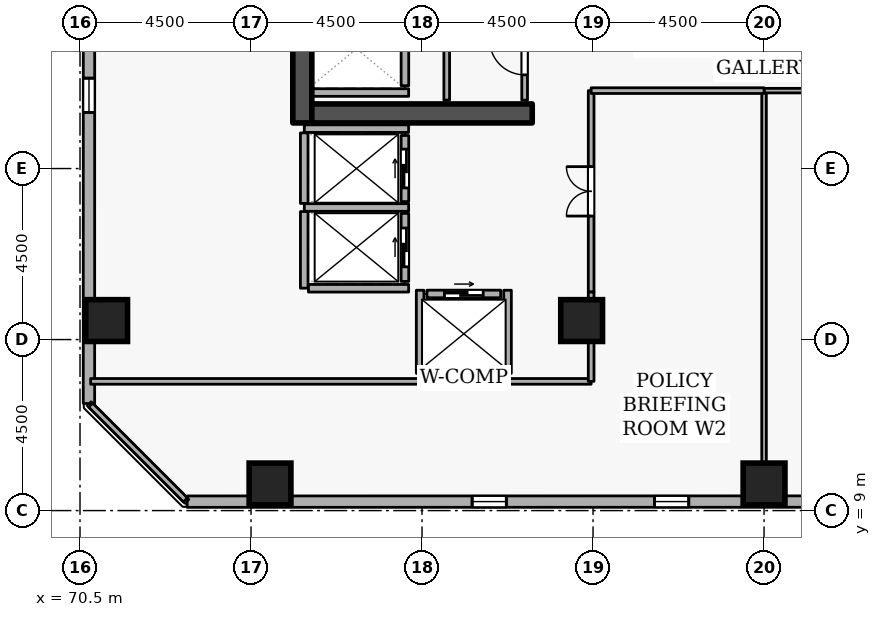
"""IFC4 building model, lengths in metres.
Left out: names, types, materials, properties, quantities, classifications, styles, units other than length and angle.
Written with IfcOpenShell. Run it as: python <this file> out.ifc"""

import sys

from ifc_helpers import new_model, si_unit, direction, frame, frame_2d, origin, origin_2d, place, context, subcontext, project, spatial, rectangle, extrude, element, fill, save


model = new_model("IFC4")
c1 = context("Model", 3, precision=1e-05, world=origin(), true_north=direction((0.0, 1.0)))
c2 = subcontext(c1, "Body", "Model", "MODEL_VIEW")
j1 = project(units=[si_unit("LENGTHUNIT", "METRE"), si_unit("PLANEANGLEUNIT", "RADIAN")], contexts=[c1])
p1 = place(None, origin())
s1 = spatial("IfcSite", under=j1, at=p1, CompositionType="ELEMENT")
p2 = place(p1, origin())
s2 = spatial("IfcBuilding", under=s1, at=p2, CompositionType="ELEMENT")
p3 = place(p2, frame((0.0, 0.0, 156.3)))
s3 = spatial("IfcBuildingStorey", under=s2, at=p3, CompositionType="ELEMENT", Elevation=156.3)
p4 = place(p3, frame((76.35, 19.2, 0.0), z_axis=(0.0, 0.0, 1.0), x_axis=(0.0, 1.0, 0.0)))
e1 = element("IfcWall", 1, at=p4, inside=s3, PredefinedType="SHEAR", context=c2, shape_type="SweptSolid", body=[
    extrude(rectangle(XDim=15.6, YDim=0.5, at=frame_2d((7.8, 0.0))), origin(), (0.0, 0.0, 1.0), 3.6),
])
p5 = place(p3, frame((76.6, 19.45, 0.0), z_axis=(0.0, 0.0, 1.0), x_axis=(1.0, 0.0, 0.0)))
e2 = element("IfcWall", 2, at=p5, inside=s3, PredefinedType="SHEAR", context=c2, shape_type="SweptSolid", body=[
    extrude(rectangle(XDim=5.8, YDim=0.5, at=frame_2d((2.9, 0.0))), origin(), (0.0, 0.0, 1.0), 3.6),
])
for number, where, z_axis, x_axis in (
    (3, (71.2, 14.0, 0.0), (0.0, 0.0, 1.0), (1.0, 0.0, 0.0)),
    (4, (88.5, 9.7, 0.0), (0.0, 0.0, 1.0), (1.0, 0.0, 0.0)),
    (5, (75.5, 9.7, 0.0), (0.0, 0.0, 1.0), (1.0, 0.0, 0.0)),
    (6, (83.7, 14.0, 0.0), (0.0, 0.0, 1.0), (1.0, 0.0, 0.0)),
):
    element("IfcColumn", number, at=place(p3, frame(where, z_axis=z_axis, x_axis=x_axis)), inside=s3, PredefinedType="COLUMN", context=c2, shape_type="SweptSolid", body=[
        extrude(rectangle(XDim=1.1, YDim=1.1, at=origin_2d()), origin(), (0.0, 0.0, 1.0), 3.6),
    ])
p6 = place(p3, frame((73.319, 9.235, 0.0), z_axis=(0.0, 0.0, 1.0), x_axis=(0.999999994606, 0.000103863011, 0.0)))
e7 = element("IfcWall", 7, at=p6, inside=s3, PredefinedType="STANDARD", context=c2, shape_type="SweptSolid", body=[
    extrude(rectangle(XDim=35.259, YDim=0.3, at=frame_2d((17.629, 0.0))), origin(), (0.0, 0.0, 1.0), 2.7),
])
p7 = place(p6, frame((7.5, 0.0, 0.72)))
e8 = element("IfcOpeningElement", 8, at=p7, cuts=e7, PredefinedType="OPENING", context=c2, shape_type="SweptSolid", body=[
    extrude(rectangle(XDim=0.9, YDim=1.75, at=frame_2d((0.45, 0.875))), frame((0.0, 0.16, 0.0), z_axis=(0.0, -1.0, 0.0), x_axis=(1.0, 0.0, 0.0)), (0.0, 0.0, 1.0), 0.32),
])
p8 = place(p6, frame((12.3, 0.0, 0.72)))
e9 = element("IfcOpeningElement", 9, at=p8, cuts=e7, PredefinedType="OPENING", context=c2, shape_type="SweptSolid", body=[
    extrude(rectangle(XDim=0.9, YDim=1.75, at=frame_2d((0.45, 0.875))), frame((0.0, 0.16, 0.0), z_axis=(0.0, -1.0, 0.0), x_axis=(1.0, 0.0, 0.0)), (0.0, 0.0, 1.0), 0.32),
])
p9 = place(p6, frame((17.1, 0.0, 0.72)))
e10 = element("IfcOpeningElement", 10, at=p9, cuts=e7, PredefinedType="OPENING", context=c2, shape_type="SweptSolid", body=[
    extrude(rectangle(XDim=0.9, YDim=1.75, at=frame_2d((0.45, 0.875))), frame((0.0, 0.16, 0.0), z_axis=(0.0, -1.0, 0.0), x_axis=(1.0, 0.0, 0.0)), (0.0, 0.0, 1.0), 0.32),
])
p10 = place(p6, frame((21.9, 0.0, 0.72)))
e11 = element("IfcOpeningElement", 11, at=p10, cuts=e7, PredefinedType="OPENING", context=c2, shape_type="SweptSolid", body=[
    extrude(rectangle(XDim=0.9, YDim=1.75, at=frame_2d((0.45, 0.875))), frame((0.0, 0.16, 0.0), z_axis=(0.0, -1.0, 0.0), x_axis=(1.0, 0.0, 0.0)), (0.0, 0.0, 1.0), 0.32),
])
p11 = place(p6, frame((31.5, 0.0, 0.72)))
e12 = element("IfcOpeningElement", 12, at=p11, cuts=e7, PredefinedType="OPENING", context=c2, shape_type="SweptSolid", body=[
    extrude(rectangle(XDim=0.9, YDim=1.75, at=frame_2d((0.45, 0.875))), frame((0.0, 0.16, 0.0), z_axis=(0.0, -1.0, 0.0), x_axis=(1.0, 0.0, 0.0)), (0.0, 0.0, 1.0), 0.32),
])
p12 = place(p3, frame((70.739, 47.078, 0.0), z_axis=(0.0, 0.0, 1.0), x_axis=(-0.000103863011, -0.999999994606, 0.0)))
e13 = element("IfcWall", 13, at=p12, inside=s3, PredefinedType="STANDARD", context=c2, shape_type="SweptSolid", body=[
    extrude(rectangle(XDim=35.259, YDim=0.3, at=frame_2d((17.629, 0.0))), origin(), (0.0, 0.0, 1.0), 2.7),
])
p13 = place(p12, frame((2.7, 0.0, 0.72)))
e14 = element("IfcOpeningElement", 14, at=p13, cuts=e13, PredefinedType="OPENING", context=c2, shape_type="SweptSolid", body=[
    extrude(rectangle(XDim=0.9, YDim=1.75, at=frame_2d((0.45, 0.875))), frame((0.0, 0.16, 0.0), z_axis=(0.0, -1.0, 0.0), x_axis=(1.0, 0.0, 0.0)), (0.0, 0.0, 1.0), 0.32),
])
p14 = place(p12, frame((12.3, 0.0, 0.72)))
e15 = element("IfcOpeningElement", 15, at=p14, cuts=e13, PredefinedType="OPENING", context=c2, shape_type="SweptSolid", body=[
    extrude(rectangle(XDim=0.9, YDim=1.75, at=frame_2d((0.45, 0.875))), frame((0.0, 0.16, 0.0), z_axis=(0.0, -1.0, 0.0), x_axis=(1.0, 0.0, 0.0)), (0.0, 0.0, 1.0), 0.32),
])
p15 = place(p12, frame((17.1, 0.0, 0.72)))
e16 = element("IfcOpeningElement", 16, at=p15, cuts=e13, PredefinedType="OPENING", context=c2, shape_type="SweptSolid", body=[
    extrude(rectangle(XDim=0.9, YDim=1.75, at=frame_2d((0.45, 0.875))), frame((0.0, 0.16, 0.0), z_axis=(0.0, -1.0, 0.0), x_axis=(1.0, 0.0, 0.0)), (0.0, 0.0, 1.0), 0.32),
])
p16 = place(p12, frame((21.9, 0.0, 0.72)))
e17 = element("IfcOpeningElement", 17, at=p16, cuts=e13, PredefinedType="OPENING", context=c2, shape_type="SweptSolid", body=[
    extrude(rectangle(XDim=0.9, YDim=1.75, at=frame_2d((0.45, 0.875))), frame((0.0, 0.16, 0.0), z_axis=(0.0, -1.0, 0.0), x_axis=(1.0, 0.0, 0.0)), (0.0, 0.0, 1.0), 0.32),
])
p17 = place(p12, frame((26.7, 0.0, 0.72)))
e18 = element("IfcOpeningElement", 18, at=p17, cuts=e13, PredefinedType="OPENING", context=c2, shape_type="SweptSolid", body=[
    extrude(rectangle(XDim=0.9, YDim=1.75, at=frame_2d((0.45, 0.875))), frame((0.0, 0.16, 0.0), z_axis=(0.0, -1.0, 0.0), x_axis=(1.0, 0.0, 0.0)), (0.0, 0.0, 1.0), 0.32),
])
p18 = place(p3, frame((79.05, 20.18, 0.0), z_axis=(0.0, 0.0, 1.0), x_axis=(0.0, 1.0, 0.0)))
e19 = element("IfcWall", 19, at=p18, inside=s3, PredefinedType="STANDARD", context=c2, shape_type="SweptSolid", body=[
    extrude(rectangle(XDim=1.94, YDim=0.2, at=frame_2d((0.97, 0.0))), origin(), (0.0, 0.0, 1.0), 3.34),
])
p19 = place(p3, frame((79.05, 17.13, 0.0), z_axis=(0.0, 0.0, 1.0), x_axis=(0.0, 1.0, 0.0)))
e20 = element("IfcWall", 20, at=p19, inside=s3, PredefinedType="STANDARD", context=c2, shape_type="SweptSolid", body=[
    extrude(rectangle(XDim=1.74, YDim=0.2, at=frame_2d((0.87, 0.0))), origin(), (0.0, 0.0, 1.0), 3.34),
])
p20 = place(p19, frame((0.36, 0.0, 0.0)))
e21 = element("IfcOpeningElement", 21, at=p20, cuts=e20, PredefinedType="OPENING", context=c2, shape_type="SweptSolid", body=[
    extrude(rectangle(XDim=1.02, YDim=2.06, at=frame_2d((0.51, 1.03))), frame((0.0, 0.11, 0.0), z_axis=(0.0, -1.0, 0.0), x_axis=(1.0, 0.0, 0.0)), (0.0, 0.0, 1.0), 0.22),
])
p21 = place(p3, frame((79.05, 15.03, 0.0), z_axis=(0.0, 0.0, 1.0), x_axis=(0.0, 1.0, 0.0)))
e22 = element("IfcWall", 22, at=p21, inside=s3, PredefinedType="STANDARD", context=c2, shape_type="SweptSolid", body=[
    extrude(rectangle(XDim=1.79, YDim=0.2, at=frame_2d((0.895, 0.0))), origin(), (0.0, 0.0, 1.0), 3.34),
])
p22 = place(p21, frame((0.385, 0.0, 0.0)))
e23 = element("IfcOpeningElement", 23, at=p22, cuts=e22, PredefinedType="OPENING", context=c2, shape_type="SweptSolid", body=[
    extrude(rectangle(XDim=1.02, YDim=2.06, at=frame_2d((0.51, 1.03))), frame((0.0, 0.11, 0.0), z_axis=(0.0, -1.0, 0.0), x_axis=(1.0, 0.0, 0.0)), (0.0, 0.0, 1.0), 0.22),
])
p23 = place(p3, frame((79.63, 14.7, 0.0), z_axis=(0.0, 0.0, 1.0), x_axis=(1.0, 0.0, 0.0)))
e24 = element("IfcWall", 24, at=p23, inside=s3, PredefinedType="STANDARD", context=c2, shape_type="SweptSolid", body=[
    extrude(rectangle(XDim=1.94, YDim=0.2, at=frame_2d((0.97, 0.0))), origin(), (0.0, 0.0, 1.0), 3.34),
])
p24 = place(p23, frame((0.46, 0.0, 0.0)))
e25 = element("IfcOpeningElement", 25, at=p24, cuts=e24, PredefinedType="OPENING", context=c2, shape_type="SweptSolid", body=[
    extrude(rectangle(XDim=1.02, YDim=2.06, at=frame_2d((0.51, 1.03))), frame((0.0, 0.11, 0.0), z_axis=(0.0, -1.0, 0.0), x_axis=(1.0, 0.0, 0.0)), (0.0, 0.0, 1.0), 0.22),
])
p25 = place(p3, frame((76.612, 20.0, 0.0), z_axis=(0.0, 0.0, 1.0), x_axis=(1.0, 0.0, 0.0)))
e26 = element("IfcWall", 26, at=p25, inside=s3, PredefinedType="STANDARD", context=c2, shape_type="SweptSolid", body=[
    extrude(rectangle(XDim=2.536, YDim=0.2, at=frame_2d((1.268, 0.0))), origin(), (0.0, 0.0, 1.0), 3.34),
])
p26 = place(p3, frame((76.402, 19.05, 0.0), z_axis=(0.0, 0.0, 1.0), x_axis=(1.0, 0.0, 0.0)))
e27 = element("IfcWall", 27, at=p26, inside=s3, PredefinedType="STANDARD", context=c2, shape_type="SweptSolid", body=[
    extrude(rectangle(XDim=2.746, YDim=0.2, at=frame_2d((1.373, 0.0))), origin(), (0.0, 0.0, 1.0), 2.545),
])
p27 = place(p3, frame((76.402, 16.975, 0.0), z_axis=(0.0, 0.0, 1.0), x_axis=(1.0, 0.0, 0.0)))
e28 = element("IfcWall", 28, at=p27, inside=s3, PredefinedType="STANDARD", context=c2, shape_type="SweptSolid", body=[
    extrude(rectangle(XDim=2.746, YDim=0.2, at=frame_2d((1.373, 0.0))), origin(), (0.0, 0.0, 1.0), 3.34),
])
p28 = place(p3, frame((76.4, 14.852, 0.0), z_axis=(0.0, 0.0, 1.0), x_axis=(0.0, 1.0, 0.0)))
e29 = element("IfcWall", 29, at=p28, inside=s3, PredefinedType="STANDARD", context=c2, shape_type="SweptSolid", body=[
    extrude(rectangle(XDim=2.016, YDim=0.2, at=frame_2d((1.008, 0.0))), origin(), (0.0, 0.0, 1.0), 3.34),
])
p29 = place(p3, frame((76.4, 17.082, 0.0), z_axis=(0.0, 0.0, 1.0), x_axis=(0.0, 1.0, 0.0)))
e30 = element("IfcWall", 30, at=p29, inside=s3, PredefinedType="STANDARD", context=c2, shape_type="SweptSolid", body=[
    extrude(rectangle(XDim=1.856, YDim=0.2, at=frame_2d((0.928, 0.0))), origin(), (0.0, 0.0, 1.0), 3.34),
])
p30 = place(p3, frame((76.512, 14.85, 0.0), z_axis=(0.0, 0.0, 1.0), x_axis=(1.0, 0.0, 0.0)))
e31 = element("IfcWall", 31, at=p30, inside=s3, PredefinedType="STANDARD", context=c2, shape_type="SweptSolid", body=[
    extrude(rectangle(XDim=2.636, YDim=0.2, at=frame_2d((1.318, 0.0))), origin(), (0.0, 0.0, 1.0), 3.34),
])
p31 = place(p3, frame((79.452, 12.5, 0.0), z_axis=(0.0, 0.0, 1.0), x_axis=(1.0, 0.0, 0.0)))
e32 = element("IfcWall", 32, at=p31, inside=s3, PredefinedType="STANDARD", context=c2, shape_type="SweptSolid", body=[
    extrude(rectangle(XDim=2.296, YDim=0.2, at=frame_2d((1.148, 0.0))), origin(), (0.0, 0.0, 1.0), 3.34),
])
for number, where, z_axis, x_axis in (
    (33, (81.75, 12.612, 0.0), (0.0, 0.0, 1.0), (0.0, 1.0, 0.0)),
    (34, (79.45, 12.612, 0.0), (0.0, 0.0, 1.0), (0.0, 1.0, 0.0)),
):
    element("IfcWall", number, at=place(p3, frame(where, z_axis=z_axis, x_axis=x_axis)), inside=s3, PredefinedType="STANDARD", context=c2, shape_type="SweptSolid", body=[
        extrude(rectangle(XDim=2.186, YDim=0.2, at=frame_2d((1.093, 0.0))), origin(), (0.0, 0.0, 1.0), 3.34),
    ])
p32 = place(p3, frame((82.2, 19.8, 0.0), z_axis=(0.0, 0.0, 1.0), x_axis=(0.0, 1.0, 0.0)))
e35 = element("IfcWall", 35, at=p32, inside=s3, PredefinedType="PARTITIONING", context=c2, shape_type="SweptSolid", body=[
    extrude(rectangle(XDim=2.25, YDim=0.15, at=frame_2d((1.125, 0.0))), origin(), (0.0, 0.0, 1.0), 3.34),
])
p33 = place(p32, frame((0.665, 0.0, 0.0)))
e36 = element("IfcOpeningElement", 36, at=p33, cuts=e35, PredefinedType="OPENING", context=c2, shape_type="SweptSolid", body=[
    extrude(rectangle(XDim=0.92, YDim=2.08, at=frame_2d((0.46, 1.04))), frame((0.0, 0.085, 0.0), z_axis=(0.0, -1.0, 0.0), x_axis=(1.0, 0.0, 0.0)), (0.0, 0.0, 1.0), 0.17),
])
p34 = place(p3, frame((80.15, 22.05, 0.0), z_axis=(0.0, 0.0, 1.0), x_axis=(0.0, -1.0, 0.0)))
e37 = element("IfcWall", 37, at=p34, inside=s3, PredefinedType="PARTITIONING", context=c2, shape_type="SweptSolid", body=[
    extrude(rectangle(XDim=2.25, YDim=0.15, at=frame_2d((1.125, 0.0))), origin(), (0.0, 0.0, 1.0), 3.34),
])
p35 = place(p3, frame((88.5, 9.28, 0.0), z_axis=(0.0, 0.0, 1.0), x_axis=(0.0, 1.0, 0.0)))
e38 = element("IfcWall", 38, at=p35, inside=s3, PredefinedType="PARTITIONING", context=c2, shape_type="SweptSolid", body=[
    extrude(rectangle(XDim=10.77, YDim=0.12, at=frame_2d((5.385, 0.0))), origin(), (0.0, 0.0, 1.0), 2.932),
])
p36 = place(p3, frame((88.5, 20.05, 0.0), z_axis=(0.0, 0.0, 1.0), x_axis=(1.0, 0.0, 0.0)))
e39 = element("IfcWall", 39, at=p36, inside=s3, PredefinedType="PARTITIONING", context=c2, shape_type="SweptSolid", body=[
    extrude(rectangle(XDim=4.55, YDim=0.12, at=frame_2d((2.275, 0.0))), origin(), (0.0, 0.0, 1.0), 3.34),
])
p37 = place(p3, frame((83.95, 14.75, 0.0), z_axis=(0.0, 0.0, 1.0), x_axis=(0.0, 1.0, 0.0)))
e40 = element("IfcWall", 40, at=p37, inside=s3, PredefinedType="PARTITIONING", context=c2, shape_type="SweptSolid", body=[
    extrude(rectangle(XDim=5.3, YDim=0.15, at=frame_2d((2.65, 0.0))), origin(), (0.0, 0.0, 1.0), 3.34),
])
p38 = place(p37, frame((2.0, 0.0, 0.0)))
e41 = element("IfcOpeningElement", 41, at=p38, cuts=e40, PredefinedType="OPENING", context=c2, shape_type="SweptSolid", body=[
    extrude(rectangle(XDim=1.3, YDim=2.12, at=frame_2d((0.65, 1.06))), frame((0.0, 0.085, 0.0), z_axis=(0.0, -1.0, 0.0), x_axis=(1.0, 0.0, 0.0)), (0.0, 0.0, 1.0), 0.17),
])
p39 = place(p3, frame((83.95, 20.05, 0.0), z_axis=(0.0, 0.0, 1.0), x_axis=(1.0, 0.0, 0.0)))
e42 = element("IfcWall", 42, at=p39, inside=s3, PredefinedType="PARTITIONING", context=c2, shape_type="SweptSolid", body=[
    extrude(rectangle(XDim=4.55, YDim=0.15, at=frame_2d((2.275, 0.0))), origin(), (0.0, 0.0, 1.0), 3.34),
])
p40 = place(p3, frame((73.275, 9.28, 0.0), z_axis=(0.0, 0.0, 1.0), x_axis=(-0.707106781187, 0.707106781187, 0.0)))
e43 = element("IfcWall", 43, at=p40, inside=s3, PredefinedType="PARTITIONING", context=c2, shape_type="SweptSolid", body=[
    extrude(rectangle(XDim=3.528, YDim=0.15, at=frame_2d((1.764, 0.0))), origin(), (0.0, 0.0, 1.0), 3.34),
])
p41 = place(p3, frame((70.78, 12.4, 0.0), z_axis=(0.0, 0.0, 1.0), x_axis=(1.0, 0.0, 0.0)))
e44 = element("IfcWall", 44, at=p41, inside=s3, PredefinedType="PARTITIONING", context=c2, shape_type="SweptSolid", body=[
    extrude(rectangle(XDim=8.672, YDim=0.15, at=frame_2d((4.336, 0.0))), origin(), (0.0, 0.0, 1.0), 3.34),
])
p42 = place(p3, frame((81.748, 12.4, 0.0), z_axis=(0.0, 0.0, 1.0), x_axis=(1.0, 0.0, 0.0)))
e45 = element("IfcWall", 45, at=p42, inside=s3, PredefinedType="PARTITIONING", context=c2, shape_type="SweptSolid", body=[
    extrude(rectangle(XDim=2.202, YDim=0.15, at=frame_2d((1.101, 0.0))), origin(), (0.0, 0.0, 1.0), 3.34),
])
p43 = place(p3, frame((83.95, 12.4, 0.0), z_axis=(0.0, 0.0, 1.0), x_axis=(0.0, 1.0, 0.0)))
e46 = element("IfcWall", 46, at=p43, inside=s3, PredefinedType="PARTITIONING", context=c2, shape_type="SweptSolid", body=[
    extrude(rectangle(XDim=2.35, YDim=0.15, at=frame_2d((1.175, 0.0))), origin(), (0.0, 0.0, 1.0), 3.34),
])
p44 = place(p7, origin())
e47 = element("IfcWindow", 47, at=p44, inside=s3, PartitioningType="SINGLE_PANEL", PredefinedType="WINDOW", context=c2, shape_type="SweptSolid", body=[
    extrude(rectangle(XDim=0.9, YDim=1.75, at=frame_2d((0.45, 0.875))), frame((0.0, 0.03, 0.0), z_axis=(0.0, -1.0, 0.0), x_axis=(1.0, 0.0, 0.0)), (0.0, 0.0, 1.0), 0.06),
])
fill(e8, e47)
p45 = place(p8, origin())
e48 = element("IfcWindow", 48, at=p45, inside=s3, PartitioningType="SINGLE_PANEL", PredefinedType="WINDOW", context=c2, shape_type="SweptSolid", body=[
    extrude(rectangle(XDim=0.9, YDim=1.75, at=frame_2d((0.45, 0.875))), frame((0.0, 0.03, 0.0), z_axis=(0.0, -1.0, 0.0), x_axis=(1.0, 0.0, 0.0)), (0.0, 0.0, 1.0), 0.06),
])
fill(e9, e48)
p46 = place(p17, origin())
e49 = element("IfcWindow", 49, at=p46, inside=s3, PartitioningType="SINGLE_PANEL", PredefinedType="WINDOW", context=c2, shape_type="SweptSolid", body=[
    extrude(rectangle(XDim=0.9, YDim=1.75, at=frame_2d((0.45, 0.875))), frame((0.0, 0.03, 0.0), z_axis=(0.0, -1.0, 0.0), x_axis=(1.0, 0.0, 0.0)), (0.0, 0.0, 1.0), 0.06),
])
fill(e18, e49)
p47 = place(p20, origin())
e50 = element("IfcDoor", 50, at=p47, inside=s3, OperationType="SLIDING_TO_LEFT", PredefinedType="DOOR", context=c2, shape_type="SweptSolid", body=[
    extrude(rectangle(XDim=1.02, YDim=2.06, at=frame_2d((0.51, 1.03))), frame((0.0, 0.025, 0.0), z_axis=(0.0, -1.0, 0.0), x_axis=(1.0, 0.0, 0.0)), (0.0, 0.0, 1.0), 0.05),
])
fill(e21, e50)
p48 = place(p22, origin())
e51 = element("IfcDoor", 51, at=p48, inside=s3, OperationType="SLIDING_TO_LEFT", PredefinedType="DOOR", context=c2, shape_type="SweptSolid", body=[
    extrude(rectangle(XDim=1.02, YDim=2.06, at=frame_2d((0.51, 1.03))), frame((0.0, 0.025, 0.0), z_axis=(0.0, -1.0, 0.0), x_axis=(1.0, 0.0, 0.0)), (0.0, 0.0, 1.0), 0.05),
])
fill(e23, e51)
p49 = place(p24, origin())
e52 = element("IfcDoor", 52, at=p49, inside=s3, OperationType="SLIDING_TO_LEFT", PredefinedType="DOOR", context=c2, shape_type="SweptSolid", body=[
    extrude(rectangle(XDim=1.02, YDim=2.06, at=frame_2d((0.51, 1.03))), frame((0.0, 0.025, 0.0), z_axis=(0.0, -1.0, 0.0), x_axis=(1.0, 0.0, 0.0)), (0.0, 0.0, 1.0), 0.05),
])
fill(e25, e52)
p50 = place(p33, origin())
e53 = element("IfcDoor", 53, at=p50, inside=s3, OperationType="SINGLE_SWING_RIGHT", PredefinedType="DOOR", context=c2, shape_type="SweptSolid", body=[
    extrude(rectangle(XDim=0.92, YDim=2.08, at=frame_2d((0.46, 1.04))), frame((0.0, 0.025, 0.0), z_axis=(0.0, -1.0, 0.0), x_axis=(1.0, 0.0, 0.0)), (0.0, 0.0, 1.0), 0.05),
])
fill(e36, e53)
p51 = place(p38, origin())
e54 = element("IfcDoor", 54, at=p51, inside=s3, OperationType="DOUBLE_DOOR_SINGLE_SWING", PredefinedType="DOOR", context=c2, shape_type="SweptSolid", body=[
    extrude(rectangle(XDim=1.3, YDim=2.12, at=frame_2d((0.65, 1.06))), frame((0.0, 0.025, 0.0), z_axis=(0.0, -1.0, 0.0), x_axis=(1.0, 0.0, 0.0)), (0.0, 0.0, 1.0), 0.05),
])
fill(e41, e54)
save(model, sys.argv[1])
